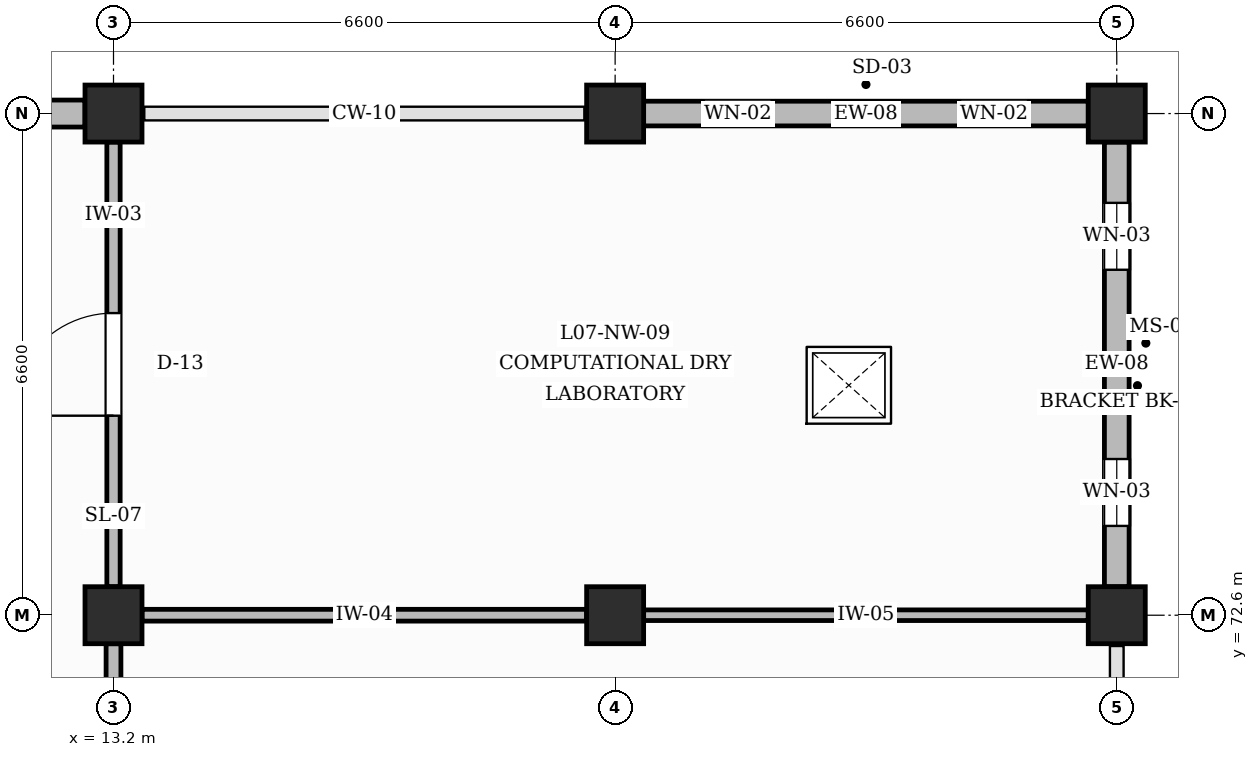
"""IFC4 building model, lengths in metres.
Left out: names, types, materials, properties, quantities, classifications, styles, units other than length and angle.
Written with IfcOpenShell. Run it as: python <this file> out.ifc"""

import sys

from ifc_helpers import new_model, si_unit, direction, frame, frame_2d, origin, origin_2d, place, context, subcontext, project, spatial, rectangle, extrude, element, fill, save


model = new_model("IFC4")
c1 = context("Model", 3, precision=1e-05, world=origin(), true_north=direction((0.0, 1.0)))
c2 = subcontext(c1, "Body", "Model", "MODEL_VIEW")
j1 = project(units=[si_unit("LENGTHUNIT", "METRE"), si_unit("PLANEANGLEUNIT", "RADIAN")], contexts=[c1])
p1 = place(None, origin())
s1 = spatial("IfcSite", under=j1, at=p1, CompositionType="ELEMENT")
p2 = place(p1, origin())
s2 = spatial("IfcBuilding", under=s1, at=p2, CompositionType="ELEMENT")
p3 = place(p2, frame((0.0, 0.0, 31.2)))
s3 = spatial("IfcBuildingStorey", under=s2, at=p3, CompositionType="ELEMENT", Elevation=31.2)
for number, where, z_axis, x_axis in (
    (1, (13.2, 72.6, 0.0), (0.0, 0.0, 1.0), (1.0, 0.0, 0.0)),
    (2, (13.2, 79.2, 0.0), (0.0, 0.0, 1.0), (1.0, 0.0, 0.0)),
    (3, (19.8, 72.6, 0.0), (0.0, 0.0, 1.0), (1.0, 0.0, 0.0)),
    (4, (19.8, 79.2, 0.0), (0.0, 0.0, 1.0), (1.0, 0.0, 0.0)),
    (5, (26.4, 72.6, 0.0), (0.0, 0.0, 1.0), (1.0, 0.0, 0.0)),
    (6, (26.4, 79.2, 0.0), (0.0, 0.0, 1.0), (1.0, 0.0, 0.0)),
):
    element("IfcColumn", number, at=place(p3, frame(where, z_axis=z_axis, x_axis=x_axis)), inside=s3, PredefinedType="COLUMN", context=c2, shape_type="SweptSolid", body=[
        extrude(rectangle(XDim=0.75, YDim=0.75, at=origin_2d()), origin(), (0.0, 0.0, 1.0), 4.2),
    ])
p4 = place(p3, frame((6.975, 79.2, 0.0), z_axis=(0.0, 0.0, 1.0), x_axis=(1.0, 0.0, 0.0)))
e7 = element("IfcWall", 7, at=p4, inside=s3, PredefinedType="SOLIDWALL", context=c2, shape_type="SweptSolid", body=[
    extrude(rectangle(XDim=5.85, YDim=0.355, at=frame_2d((2.925, 0.0))), origin(), (0.0, 0.0, 1.0), 3.28),
])
p5 = place(p4, frame((1.805, 0.0, 0.95)))
e8 = element("IfcOpeningElement", 8, at=p5, cuts=e7, PredefinedType="OPENING", context=c2, shape_type="SweptSolid", body=[
    extrude(rectangle(XDim=2.24, YDim=1.96, at=frame_2d((1.12, 0.98))), frame((0.0, 0.188, 0.0), z_axis=(0.0, -1.0, 0.0), x_axis=(1.0, 0.0, 0.0)), (0.0, 0.0, 1.0), 0.375),
])
p6 = place(p3, frame((20.175, 79.2, 0.0), z_axis=(0.0, 0.0, 1.0), x_axis=(1.0, 0.0, 0.0)))
e9 = element("IfcWall", 9, at=p6, inside=s3, PredefinedType="SOLIDWALL", context=c2, shape_type="SweptSolid", body=[
    extrude(rectangle(XDim=5.85, YDim=0.325, at=frame_2d((2.925, 0.0))), origin(), (0.0, 0.0, 1.0), 3.28),
])
p7 = place(p6, frame((0.8, 0.0, 0.95)))
e10 = element("IfcOpeningElement", 10, at=p7, cuts=e9, PredefinedType="OPENING", context=c2, shape_type="SweptSolid", body=[
    extrude(rectangle(XDim=0.88, YDim=1.52, at=frame_2d((0.44, 0.76))), frame((0.0, 0.172, 0.0), z_axis=(0.0, -1.0, 0.0), x_axis=(1.0, 0.0, 0.0)), (0.0, 0.0, 1.0), 0.345),
])
p8 = place(p6, frame((4.17, 0.0, 0.95)))
e11 = element("IfcOpeningElement", 11, at=p8, cuts=e9, PredefinedType="OPENING", context=c2, shape_type="SweptSolid", body=[
    extrude(rectangle(XDim=0.88, YDim=1.52, at=frame_2d((0.44, 0.76))), frame((0.0, 0.172, 0.0), z_axis=(0.0, -1.0, 0.0), x_axis=(1.0, 0.0, 0.0)), (0.0, 0.0, 1.0), 0.345),
])
p9 = place(p3, frame((26.4, 72.975, 0.0), z_axis=(0.0, 0.0, 1.0), x_axis=(0.0, 1.0, 0.0)))
e12 = element("IfcWall", 12, at=p9, inside=s3, PredefinedType="SOLIDWALL", context=c2, shape_type="SweptSolid", body=[
    extrude(rectangle(XDim=5.85, YDim=0.325, at=frame_2d((2.925, 0.0))), origin(), (0.0, 0.0, 1.0), 3.28),
])
p10 = place(p9, frame((0.8, 0.0, 0.95)))
e13 = element("IfcOpeningElement", 13, at=p10, cuts=e12, PredefinedType="OPENING", context=c2, shape_type="SweptSolid", body=[
    extrude(rectangle(XDim=0.88, YDim=1.74, at=frame_2d((0.44, 0.87))), frame((0.0, 0.172, 0.0), z_axis=(0.0, -1.0, 0.0), x_axis=(1.0, 0.0, 0.0)), (0.0, 0.0, 1.0), 0.345),
])
p11 = place(p9, frame((4.17, 0.0, 0.95)))
e14 = element("IfcOpeningElement", 14, at=p11, cuts=e12, PredefinedType="OPENING", context=c2, shape_type="SweptSolid", body=[
    extrude(rectangle(XDim=0.88, YDim=1.74, at=frame_2d((0.44, 0.87))), frame((0.0, 0.172, 0.0), z_axis=(0.0, -1.0, 0.0), x_axis=(1.0, 0.0, 0.0)), (0.0, 0.0, 1.0), 0.345),
])
p12 = place(p3, frame((13.2, 66.375, 0.0), z_axis=(0.0, 0.0, 1.0), x_axis=(0.0, 1.0, 0.0)))
e15 = element("IfcWall", 15, at=p12, inside=s3, PredefinedType="PARTITIONING", context=c2, shape_type="SweptSolid", body=[
    extrude(rectangle(XDim=5.85, YDim=0.195, at=frame_2d((2.925, 0.0))), origin(), (0.0, 0.0, 1.0), 3.18),
])
p13 = place(p12, frame((2.225, 0.0, 0.0)))
e16 = element("IfcOpeningElement", 16, at=p13, cuts=e15, PredefinedType="OPENING", context=c2, shape_type="SweptSolid", body=[
    extrude(rectangle(XDim=1.4, YDim=2.25, at=frame_2d((0.7, 1.125))), frame((0.0, 0.107, 0.0), z_axis=(0.0, -1.0, 0.0), x_axis=(1.0, 0.0, 0.0)), (0.0, 0.0, 1.0), 0.215),
])
p14 = place(p3, frame((13.2, 72.975, 0.0), z_axis=(0.0, 0.0, 1.0), x_axis=(0.0, 1.0, 0.0)))
e17 = element("IfcWall", 17, at=p14, inside=s3, PredefinedType="PARTITIONING", context=c2, shape_type="SweptSolid", body=[
    extrude(rectangle(XDim=5.85, YDim=0.175, at=frame_2d((2.925, 0.0))), origin(), (0.0, 0.0, 1.0), 3.18),
])
p15 = place(p14, frame((2.25, 0.0, 0.0)))
e18 = element("IfcOpeningElement", 18, at=p15, cuts=e17, PredefinedType="OPENING", context=c2, shape_type="SweptSolid", body=[
    extrude(rectangle(XDim=1.35, YDim=2.3, at=frame_2d((0.675, 1.15))), frame((0.0, 0.097, 0.0), z_axis=(0.0, -1.0, 0.0), x_axis=(1.0, 0.0, 0.0)), (0.0, 0.0, 1.0), 0.195),
])
p16 = place(p3, frame((13.575, 72.6, 0.0), z_axis=(0.0, 0.0, 1.0), x_axis=(1.0, 0.0, 0.0)))
e19 = element("IfcWall", 19, at=p16, inside=s3, PredefinedType="PARTITIONING", context=c2, shape_type="SweptSolid", body=[
    extrude(rectangle(XDim=5.85, YDim=0.155, at=frame_2d((2.925, 0.0))), origin(), (0.0, 0.0, 1.0), 3.18),
])
p17 = place(p3, frame((20.175, 72.6, 0.0), z_axis=(0.0, 0.0, 1.0), x_axis=(1.0, 0.0, 0.0)))
e20 = element("IfcWall", 20, at=p17, inside=s3, PredefinedType="PARTITIONING", context=c2, shape_type="SweptSolid", body=[
    extrude(rectangle(XDim=5.85, YDim=0.14, at=frame_2d((2.925, 0.0))), origin(), (0.0, 0.0, 1.0), 3.18),
])
p18 = place(p7, origin())
e21 = element("IfcWindow", 21, at=p18, inside=s3, PartitioningType="SINGLE_PANEL", PredefinedType="WINDOW", context=c2, shape_type="SweptSolid", body=[
    extrude(rectangle(XDim=0.88, YDim=1.52, at=frame_2d((0.44, 0.76))), frame((0.0, 0.03, 0.0), z_axis=(0.0, -1.0, 0.0), x_axis=(1.0, 0.0, 0.0)), (0.0, 0.0, 1.0), 0.06),
])
fill(e10, e21)
p19 = place(p8, origin())
e22 = element("IfcWindow", 22, at=p19, inside=s3, PartitioningType="SINGLE_PANEL", PredefinedType="WINDOW", context=c2, shape_type="SweptSolid", body=[
    extrude(rectangle(XDim=0.88, YDim=1.52, at=frame_2d((0.44, 0.76))), frame((0.0, 0.03, 0.0), z_axis=(0.0, -1.0, 0.0), x_axis=(1.0, 0.0, 0.0)), (0.0, 0.0, 1.0), 0.06),
])
fill(e11, e22)
p20 = place(p10, origin())
e23 = element("IfcWindow", 23, at=p20, inside=s3, PartitioningType="SINGLE_PANEL", PredefinedType="WINDOW", context=c2, shape_type="SweptSolid", body=[
    extrude(rectangle(XDim=0.88, YDim=1.74, at=frame_2d((0.44, 0.87))), frame((0.0, 0.03, 0.0), z_axis=(0.0, -1.0, 0.0), x_axis=(1.0, 0.0, 0.0)), (0.0, 0.0, 1.0), 0.06),
])
fill(e13, e23)
p21 = place(p11, origin())
e24 = element("IfcWindow", 24, at=p21, inside=s3, PartitioningType="SINGLE_PANEL", PredefinedType="WINDOW", context=c2, shape_type="SweptSolid", body=[
    extrude(rectangle(XDim=0.88, YDim=1.74, at=frame_2d((0.44, 0.87))), frame((0.0, 0.03, 0.0), z_axis=(0.0, -1.0, 0.0), x_axis=(1.0, 0.0, 0.0)), (0.0, 0.0, 1.0), 0.06),
])
fill(e14, e24)
p22 = place(p15, origin())
e25 = element("IfcDoor", 25, at=p22, inside=s3, OperationType="SINGLE_SWING_LEFT", PredefinedType="DOOR", context=c2, shape_type="SweptSolid", body=[
    extrude(rectangle(XDim=1.35, YDim=2.3, at=frame_2d((0.675, 1.15))), frame((0.0, 0.025, 0.0), z_axis=(0.0, -1.0, 0.0), x_axis=(1.0, 0.0, 0.0)), (0.0, 0.0, 1.0), 0.05),
])
fill(e18, e25)
save(model, sys.argv[1])
